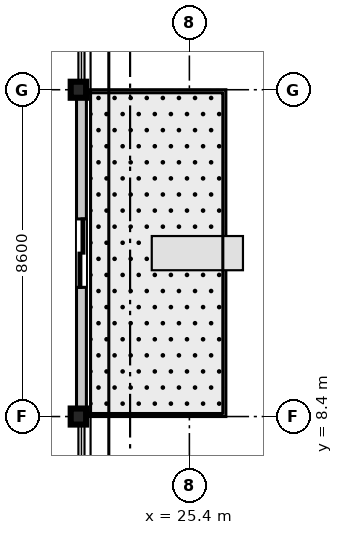
"""IFC4 building model, lengths in metres.
Left out: names, types, materials, properties, quantities, classifications, styles, units other than length and angle.
Written with IfcOpenShell. Run it as: python <this file> out.ifc"""

import sys

from ifc_helpers import new_model, si_unit, direction, frame, frame_2d, origin, origin_2d, place, context, subcontext, project, spatial, rectangle, i_section, extrude, source, transform, mapped, element, fill, save


model = new_model("IFC4")
c1 = context("Model", 3, precision=1e-05, world=origin(), true_north=direction((0.0, 1.0)))
c2 = subcontext(c1, "Body", "Model", "MODEL_VIEW")
j1 = project(units=[si_unit("LENGTHUNIT", "METRE"), si_unit("PLANEANGLEUNIT", "RADIAN")], contexts=[c1])
p1 = place(None, origin())
s1 = spatial("IfcSite", under=j1, at=p1, CompositionType="ELEMENT")
p2 = place(p1, origin())
s2 = spatial("IfcBuilding", under=s1, at=p2, CompositionType="ELEMENT")
p3 = place(p2, frame((0.0, 0.0, 149.0)))
s3 = spatial("IfcBuildingStorey", under=s2, at=p3, CompositionType="ELEMENT", Elevation=149.0)
m1 = source(origin(), c2, "Body", "SweptSolid", [
    extrude(i_section(OverallWidth=0.406, OverallDepth=0.422, WebThickness=0.019, FlangeThickness=0.03, at=origin_2d()), origin(), (0.0, 0.0, 1.0), 3.605),
])
for number, where, z_axis, x_axis in (
    (1, (22.48, 8.4, 0.0), (0.0, 0.0, 1.0), (1.0, 0.0, 0.0)),
    (2, (22.48, 17.0, 0.0), (0.0, 0.0, 1.0), (1.0, 0.0, 0.0)),
):
    element("IfcColumn", number, at=place(p3, frame(where, z_axis=z_axis, x_axis=x_axis)), inside=s3, PredefinedType="COLUMN", context=c2, shape_type="MappedRepresentation", body=[
        mapped(m1, transform((0.0, 0.0, 0.0), scale=1.0)),
    ])
m2 = source(origin(), c2, "Body", "SweptSolid", [
    extrude(rectangle(XDim=8.6, YDim=0.26, at=frame_2d((4.3, 0.0))), origin(), (0.0, 0.0, 1.0), 2.87),
])
p4 = place(p3, frame((22.56, 8.4, 0.0), z_axis=(0.0, 0.0, 1.0), x_axis=(0.0, 1.0, 0.0)))
e3 = element("IfcWall", 3, at=p4, inside=s3, PredefinedType="STANDARD", context=c2, shape_type="MappedRepresentation", body=[
    mapped(m2, transform((0.0, 0.0, 0.0), scale=1.0)),
])
p5 = place(p4, frame((3.4, 0.0, 0.0)))
e4 = element("IfcOpeningElement", 4, at=p5, cuts=e3, PredefinedType="OPENING", context=c2, shape_type="SweptSolid", body=[
    extrude(rectangle(XDim=1.8, YDim=2.25, at=frame_2d((0.9, 1.125))), frame((0.0, 0.14, 0.0), z_axis=(0.0, -1.0, 0.0), x_axis=(1.0, 0.0, 0.0)), (0.0, 0.0, 1.0), 0.28),
])
m3 = source(origin(), c2, "Body", "SweptSolid", [
    extrude(rectangle(XDim=1.8, YDim=2.25, at=frame_2d((0.9, 1.125))), frame((0.0, 0.025, 0.0), z_axis=(0.0, -1.0, 0.0), x_axis=(1.0, 0.0, 0.0)), (0.0, 0.0, 1.0), 0.05),
])
p6 = place(p5, frame((1.8, 0.0, 0.0), z_axis=(0.0, 0.0, 1.0), x_axis=(-1.0, 0.0, 0.0)))
e5 = element("IfcDoor", 5, at=p6, inside=s3, OperationType="DOUBLE_DOOR_SLIDING", PredefinedType="DOOR", context=c2, shape_type="MappedRepresentation", body=[
    mapped(m3, transform((0.0, 0.0, 0.0), scale=1.0)),
])
fill(e4, e5)
save(model, sys.argv[1])
